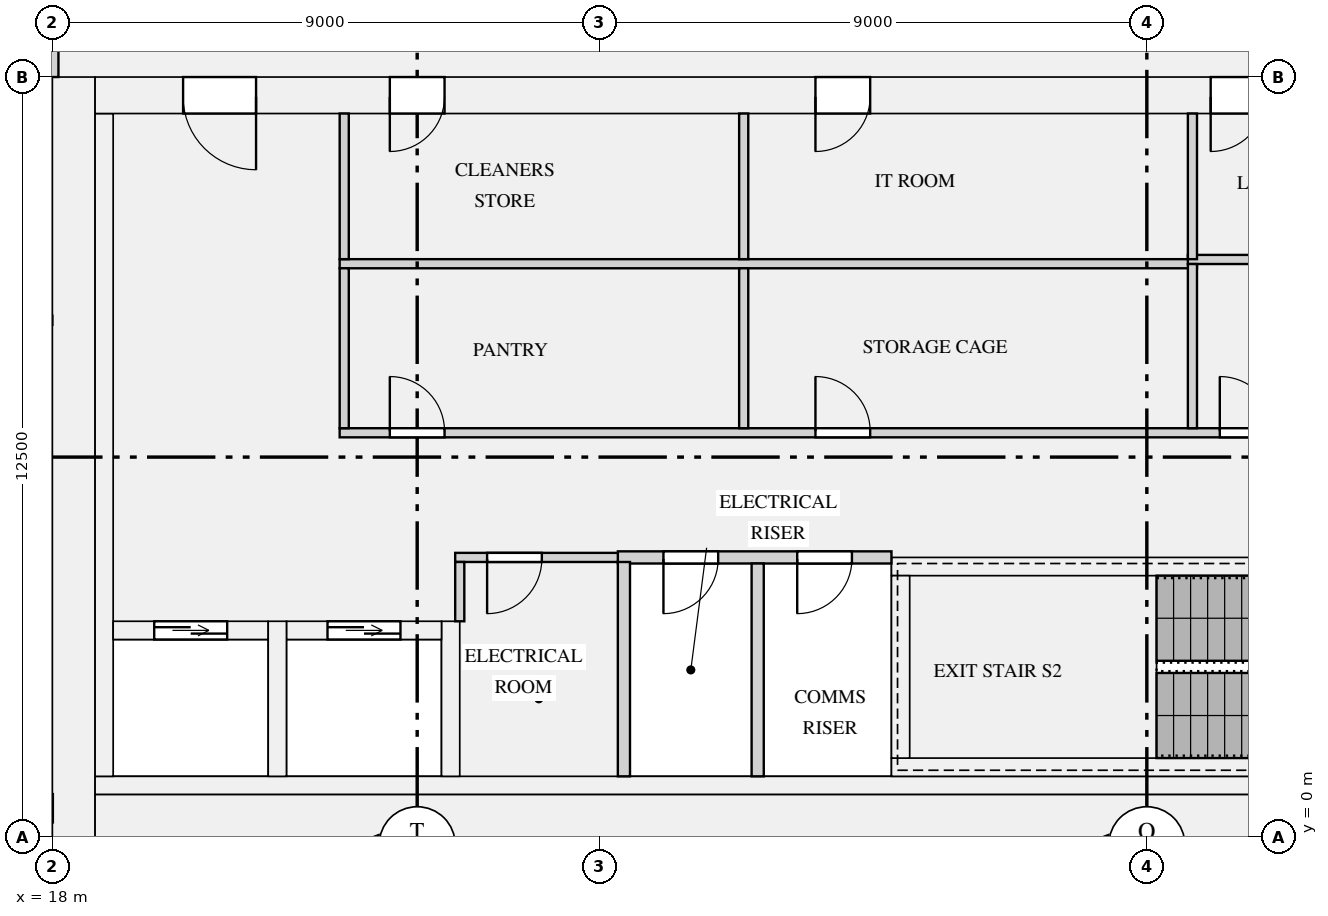
"""IFC4 building model, lengths in metres.
Left out: names, types, materials, properties, quantities, classifications, styles, units other than length and angle.
Written with IfcOpenShell. Run it as: python <this file> out.ifc"""

import sys

from ifc_helpers import new_model, si_unit, direction, frame, frame_2d, origin, place, context, subcontext, project, spatial, rectangle, extrude, element, fill, save


model = new_model("IFC4")
c1 = context("Model", 3, precision=1e-05, world=origin(), true_north=direction((0.0, 1.0)))
c2 = subcontext(c1, "Body", "Model", "MODEL_VIEW")
j1 = project(units=[si_unit("LENGTHUNIT", "METRE"), si_unit("PLANEANGLEUNIT", "RADIAN")], contexts=[c1])
p1 = place(None, origin())
s1 = spatial("IfcSite", under=j1, at=p1, CompositionType="ELEMENT")
p2 = place(p1, origin())
s2 = spatial("IfcBuilding", under=s1, at=p2, CompositionType="ELEMENT")
p3 = place(p2, frame((0.0, 0.0, 179.1)))
s3 = spatial("IfcBuildingStorey", under=s2, at=p3, CompositionType="ELEMENT", Elevation=179.1)
p4 = place(p3, frame((18.35, 0.0, 0.0), z_axis=(0.0, 0.0, 1.0), x_axis=(0.0, 1.0, 0.0)))
e1 = element("IfcWall", 1, at=p4, inside=s3, PredefinedType="SHEAR", context=c2, shape_type="SweptSolid", body=[
    extrude(rectangle(XDim=12.5, YDim=0.7, at=frame_2d((6.25, 0.0))), origin(), (0.0, 0.0, 1.0), 3.15),
])
p5 = place(p3, frame((18.7, 0.35, 0.0), z_axis=(0.0, 0.0, 1.0), x_axis=(1.0, 0.0, 0.0)))
e2 = element("IfcWall", 2, at=p5, inside=s3, PredefinedType="SHEAR", context=c2, shape_type="SweptSolid", body=[
    extrude(rectangle(XDim=34.6, YDim=0.7, at=frame_2d((17.3, 0.0))), origin(), (0.0, 0.0, 1.0), 3.15),
])
p6 = place(p3, frame((18.7, 12.2, 0.0), z_axis=(0.0, 0.0, 1.0), x_axis=(1.0, 0.0, 0.0)))
e3 = element("IfcWall", 3, at=p6, inside=s3, PredefinedType="SHEAR", context=c2, shape_type="SweptSolid", body=[
    extrude(rectangle(XDim=34.6, YDim=0.6, at=frame_2d((17.3, 0.0))), origin(), (0.0, 0.0, 1.0), 3.15),
])
p7 = place(p6, frame((24.475, 0.0, 0.0)))
e4 = element("IfcOpeningElement", 4, at=p7, cuts=e3, PredefinedType="OPENING", context=c2, shape_type="SweptSolid", body=[
    extrude(rectangle(XDim=1.1, YDim=2.1, at=frame_2d((0.55, 1.05))), frame((0.0, 0.31, 0.0), z_axis=(0.0, -1.0, 0.0), x_axis=(1.0, 0.0, 0.0)), (0.0, 0.0, 1.0), 0.62),
])
p8 = place(p6, frame((26.725, 0.0, 0.0)))
e5 = element("IfcOpeningElement", 5, at=p8, cuts=e3, PredefinedType="OPENING", context=c2, shape_type="SweptSolid", body=[
    extrude(rectangle(XDim=1.1, YDim=2.1, at=frame_2d((0.55, 1.05))), frame((0.0, 0.31, 0.0), z_axis=(0.0, -1.0, 0.0), x_axis=(1.0, 0.0, 0.0)), (0.0, 0.0, 1.0), 0.62),
])
p9 = place(p6, frame((28.975, 0.0, 0.0)))
e6 = element("IfcOpeningElement", 6, at=p9, cuts=e3, PredefinedType="OPENING", context=c2, shape_type="SweptSolid", body=[
    extrude(rectangle(XDim=1.1, YDim=2.1, at=frame_2d((0.55, 1.05))), frame((0.0, 0.31, 0.0), z_axis=(0.0, -1.0, 0.0), x_axis=(1.0, 0.0, 0.0)), (0.0, 0.0, 1.0), 0.62),
])
p10 = place(p6, frame((4.85, 0.0, 0.0)))
e7 = element("IfcOpeningElement", 7, at=p10, cuts=e3, PredefinedType="OPENING", context=c2, shape_type="SweptSolid", body=[
    extrude(rectangle(XDim=0.9, YDim=2.1, at=frame_2d((0.45, 1.05))), frame((0.0, 0.31, 0.0), z_axis=(0.0, -1.0, 0.0), x_axis=(1.0, 0.0, 0.0)), (0.0, 0.0, 1.0), 0.62),
])
p11 = place(p6, frame((11.85, 0.0, 0.0)))
e8 = element("IfcOpeningElement", 8, at=p11, cuts=e3, PredefinedType="OPENING", context=c2, shape_type="SweptSolid", body=[
    extrude(rectangle(XDim=0.9, YDim=2.1, at=frame_2d((0.45, 1.05))), frame((0.0, 0.31, 0.0), z_axis=(0.0, -1.0, 0.0), x_axis=(1.0, 0.0, 0.0)), (0.0, 0.0, 1.0), 0.62),
])
p12 = place(p6, frame((18.35, 0.0, 0.0)))
e9 = element("IfcOpeningElement", 9, at=p12, cuts=e3, PredefinedType="OPENING", context=c2, shape_type="SweptSolid", body=[
    extrude(rectangle(XDim=0.9, YDim=2.1, at=frame_2d((0.45, 1.05))), frame((0.0, 0.31, 0.0), z_axis=(0.0, -1.0, 0.0), x_axis=(1.0, 0.0, 0.0)), (0.0, 0.0, 1.0), 0.62),
])
p13 = place(p6, frame((1.45, 0.0, 0.0)))
e10 = element("IfcOpeningElement", 10, at=p13, cuts=e3, PredefinedType="OPENING", context=c2, shape_type="SweptSolid", body=[
    extrude(rectangle(XDim=1.2, YDim=2.1, at=frame_2d((0.6, 1.05))), frame((0.0, 0.31, 0.0), z_axis=(0.0, -1.0, 0.0), x_axis=(1.0, 0.0, 0.0)), (0.0, 0.0, 1.0), 0.62),
])
p14 = place(p6, frame((31.95, 0.0, 0.0)))
e11 = element("IfcOpeningElement", 11, at=p14, cuts=e3, PredefinedType="OPENING", context=c2, shape_type="SweptSolid", body=[
    extrude(rectangle(XDim=1.2, YDim=2.1, at=frame_2d((0.6, 1.05))), frame((0.0, 0.31, 0.0), z_axis=(0.0, -1.0, 0.0), x_axis=(1.0, 0.0, 0.0)), (0.0, 0.0, 1.0), 0.62),
])
p15 = place(p3, frame((18.85, 1.0, 0.0), z_axis=(0.0, 0.0, 1.0), x_axis=(0.0, 1.0, 0.0)))
e12 = element("IfcWall", 12, at=p15, inside=s3, PredefinedType="SHEAR", context=c2, shape_type="SweptSolid", body=[
    extrude(rectangle(XDim=10.9, YDim=0.3, at=frame_2d((5.45, 0.0))), origin(), (0.0, 0.0, 1.0), 3.15),
])
p16 = place(p3, frame((18.7, 0.85, 0.0), z_axis=(0.0, 0.0, 1.0), x_axis=(1.0, 0.0, 0.0)))
e13 = element("IfcWall", 13, at=p16, inside=s3, PredefinedType="SHEAR", context=c2, shape_type="SweptSolid", body=[
    extrude(rectangle(XDim=34.6, YDim=0.3, at=frame_2d((17.3, 0.0))), origin(), (0.0, 0.0, 1.0), 3.15),
])
p17 = place(p3, frame((19.0, 3.4, 0.0), z_axis=(0.0, 0.0, 1.0), x_axis=(1.0, 0.0, 0.0)))
e14 = element("IfcWall", 14, at=p17, inside=s3, PredefinedType="SHEAR", context=c2, shape_type="SweptSolid", body=[
    extrude(rectangle(XDim=2.55, YDim=0.3, at=frame_2d((1.275, 0.0))), origin(), (0.0, 0.0, 1.0), 3.15),
])
p18 = place(p17, frame((0.675, 0.0, 0.0)))
e15 = element("IfcOpeningElement", 15, at=p18, cuts=e14, PredefinedType="OPENING", context=c2, shape_type="SweptSolid", body=[
    extrude(rectangle(XDim=1.2, YDim=2.1, at=frame_2d((0.6, 1.05))), frame((0.0, 0.16, 0.0), z_axis=(0.0, -1.0, 0.0), x_axis=(1.0, 0.0, 0.0)), (0.0, 0.0, 1.0), 0.32),
])
p19 = place(p3, frame((21.85, 3.4, 0.0), z_axis=(0.0, 0.0, 1.0), x_axis=(1.0, 0.0, 0.0)))
e16 = element("IfcWall", 16, at=p19, inside=s3, PredefinedType="SHEAR", context=c2, shape_type="SweptSolid", body=[
    extrude(rectangle(XDim=2.55, YDim=0.3, at=frame_2d((1.275, 0.0))), origin(), (0.0, 0.0, 1.0), 3.15),
])
p20 = place(p19, frame((0.675, 0.0, 0.0)))
e17 = element("IfcOpeningElement", 17, at=p20, cuts=e16, PredefinedType="OPENING", context=c2, shape_type="SweptSolid", body=[
    extrude(rectangle(XDim=1.2, YDim=2.1, at=frame_2d((0.6, 1.05))), frame((0.0, 0.16, 0.0), z_axis=(0.0, -1.0, 0.0), x_axis=(1.0, 0.0, 0.0)), (0.0, 0.0, 1.0), 0.32),
])
for number, where, z_axis, x_axis in (
    (18, (21.7, 1.0, 0.0), (0.0, 0.0, 1.0), (0.0, 1.0, 0.0)),
    (19, (24.55, 1.0, 0.0), (0.0, 0.0, 1.0), (0.0, 1.0, 0.0)),
):
    element("IfcWall", number, at=place(p3, frame(where, z_axis=z_axis, x_axis=x_axis)), inside=s3, PredefinedType="SHEAR", context=c2, shape_type="SweptSolid", body=[
        extrude(rectangle(XDim=2.55, YDim=0.3, at=frame_2d((1.275, 0.0))), origin(), (0.0, 0.0, 1.0), 3.15),
    ])
p21 = place(p3, frame((31.8, 1.15, 0.0), z_axis=(0.0, 0.0, 1.0), x_axis=(1.0, 0.0, 0.0)))
e20 = element("IfcWall", 20, at=p21, inside=s3, PredefinedType="SHEAR", context=c2, shape_type="SweptSolid", body=[
    extrude(rectangle(XDim=8.4, YDim=0.3, at=frame_2d((4.2, 0.0))), origin(), (0.0, 0.0, 1.0), 3.15),
])
p22 = place(p3, frame((31.8, 4.45, 0.0), z_axis=(0.0, 0.0, 1.0), x_axis=(1.0, 0.0, 0.0)))
e21 = element("IfcWall", 21, at=p22, inside=s3, PredefinedType="SHEAR", context=c2, shape_type="SweptSolid", body=[
    extrude(rectangle(XDim=8.4, YDim=0.3, at=frame_2d((4.2, 0.0))), origin(), (0.0, 0.0, 1.0), 3.15),
])
p23 = place(p22, frame((6.8, 0.0, 0.0)))
e22 = element("IfcOpeningElement", 22, at=p23, cuts=e21, PredefinedType="OPENING", context=c2, shape_type="SweptSolid", body=[
    extrude(rectangle(XDim=1.1, YDim=2.1, at=frame_2d((0.55, 1.05))), frame((0.0, 0.16, 0.0), z_axis=(0.0, -1.0, 0.0), x_axis=(1.0, 0.0, 0.0)), (0.0, 0.0, 1.0), 0.32),
])
p24 = place(p3, frame((31.95, 1.3, 0.0), z_axis=(0.0, 0.0, 1.0), x_axis=(0.0, 1.0, 0.0)))
e23 = element("IfcWall", 23, at=p24, inside=s3, PredefinedType="SHEAR", context=c2, shape_type="SweptSolid", body=[
    extrude(rectangle(XDim=3.0, YDim=0.3, at=frame_2d((1.5, 0.0))), origin(), (0.0, 0.0, 1.0), 3.15),
])
p25 = place(p3, frame((27.3, 4.6, 0.0), z_axis=(0.0, 0.0, 1.0), x_axis=(1.0, 0.0, 0.0)))
e24 = element("IfcWall", 24, at=p25, inside=s3, PredefinedType="PARTITIONING", context=c2, shape_type="SweptSolid", body=[
    extrude(rectangle(XDim=4.5, YDim=0.2, at=frame_2d((2.25, 0.0))), origin(), (0.0, 0.0, 1.0), 2.83),
])
p26 = place(p25, frame((0.75, 0.0, 0.0)))
e25 = element("IfcOpeningElement", 25, at=p26, cuts=e24, PredefinedType="OPENING", context=c2, shape_type="SweptSolid", body=[
    extrude(rectangle(XDim=0.9, YDim=2.1, at=frame_2d((0.45, 1.05))), frame((0.0, 0.11, 0.0), z_axis=(0.0, -1.0, 0.0), x_axis=(1.0, 0.0, 0.0)), (0.0, 0.0, 1.0), 0.22),
])
p27 = place(p25, frame((2.95, 0.0, 0.0)))
e26 = element("IfcOpeningElement", 26, at=p27, cuts=e24, PredefinedType="OPENING", context=c2, shape_type="SweptSolid", body=[
    extrude(rectangle(XDim=0.9, YDim=2.1, at=frame_2d((0.45, 1.05))), frame((0.0, 0.11, 0.0), z_axis=(0.0, -1.0, 0.0), x_axis=(1.0, 0.0, 0.0)), (0.0, 0.0, 1.0), 0.22),
])
p28 = place(p3, frame((24.625, 4.6, 0.0), z_axis=(0.0, 0.0, 1.0), x_axis=(1.0, 0.0, 0.0)))
e27 = element("IfcWall", 27, at=p28, inside=s3, PredefinedType="PARTITIONING", context=c2, shape_type="SweptSolid", body=[
    extrude(rectangle(XDim=2.675, YDim=0.15, at=frame_2d((1.337, 0.0))), origin(), (0.0, 0.0, 1.0), 2.83),
])
p29 = place(p28, frame((0.525, 0.0, 0.0)))
e28 = element("IfcOpeningElement", 28, at=p29, cuts=e27, PredefinedType="OPENING", context=c2, shape_type="SweptSolid", body=[
    extrude(rectangle(XDim=0.9, YDim=2.1, at=frame_2d((0.45, 1.05))), frame((0.0, 0.085, 0.0), z_axis=(0.0, -1.0, 0.0), x_axis=(1.0, 0.0, 0.0)), (0.0, 0.0, 1.0), 0.17),
])
p30 = place(p3, frame((22.725, 6.65, 0.0), z_axis=(0.0, 0.0, 1.0), x_axis=(1.0, 0.0, 0.0)))
e29 = element("IfcWall", 29, at=p30, inside=s3, PredefinedType="PARTITIONING", context=c2, shape_type="SweptSolid", body=[
    extrude(rectangle(XDim=19.8, YDim=0.15, at=frame_2d((9.9, 0.0))), origin(), (0.0, 0.0, 1.0), 2.83),
])
p31 = place(p30, frame((0.825, 0.0, 0.0)))
e30 = element("IfcOpeningElement", 30, at=p31, cuts=e29, PredefinedType="OPENING", context=c2, shape_type="SweptSolid", body=[
    extrude(rectangle(XDim=0.9, YDim=2.1, at=frame_2d((0.45, 1.05))), frame((0.0, 0.085, 0.0), z_axis=(0.0, -1.0, 0.0), x_axis=(1.0, 0.0, 0.0)), (0.0, 0.0, 1.0), 0.17),
])
p32 = place(p30, frame((7.825, 0.0, 0.0)))
e31 = element("IfcOpeningElement", 31, at=p32, cuts=e29, PredefinedType="OPENING", context=c2, shape_type="SweptSolid", body=[
    extrude(rectangle(XDim=0.9, YDim=2.1, at=frame_2d((0.45, 1.05))), frame((0.0, 0.085, 0.0), z_axis=(0.0, -1.0, 0.0), x_axis=(1.0, 0.0, 0.0)), (0.0, 0.0, 1.0), 0.17),
])
p33 = place(p30, frame((14.475, 0.0, 0.0)))
e32 = element("IfcOpeningElement", 32, at=p33, cuts=e29, PredefinedType="OPENING", context=c2, shape_type="SweptSolid", body=[
    extrude(rectangle(XDim=0.9, YDim=2.1, at=frame_2d((0.45, 1.05))), frame((0.0, 0.085, 0.0), z_axis=(0.0, -1.0, 0.0), x_axis=(1.0, 0.0, 0.0)), (0.0, 0.0, 1.0), 0.17),
])
p34 = place(p3, frame((22.725, 9.43, 0.0), z_axis=(0.0, 0.0, 1.0), x_axis=(1.0, 0.0, 0.0)))
e33 = element("IfcWall", 33, at=p34, inside=s3, PredefinedType="PARTITIONING", context=c2, shape_type="SweptSolid", body=[
    extrude(rectangle(XDim=14.1, YDim=0.15, at=frame_2d((7.05, 0.0))), origin(), (0.0, 0.0, 1.0), 2.83),
])
p35 = place(p3, frame((36.675, 9.5, 0.0), z_axis=(0.0, 0.0, 1.0), x_axis=(1.0, 0.0, 0.0)))
e34 = element("IfcWall", 34, at=p35, inside=s3, PredefinedType="PARTITIONING", context=c2, shape_type="SweptSolid", body=[
    extrude(rectangle(XDim=5.775, YDim=0.15, at=frame_2d((2.887, 0.0))), origin(), (0.0, 0.0, 1.0), 2.83),
])
p36 = place(p3, frame((27.4, 1.0, 0.0), z_axis=(0.0, 0.0, 1.0), x_axis=(0.0, 1.0, 0.0)))
e35 = element("IfcWall", 35, at=p36, inside=s3, PredefinedType="PARTITIONING", context=c2, shape_type="SweptSolid", body=[
    extrude(rectangle(XDim=3.525, YDim=0.2, at=frame_2d((1.762, 0.0))), origin(), (0.0, 0.0, 1.0), 2.83),
])
p37 = place(p3, frame((29.6, 1.0, 0.0), z_axis=(0.0, 0.0, 1.0), x_axis=(0.0, 1.0, 0.0)))
e36 = element("IfcWall", 36, at=p37, inside=s3, PredefinedType="PARTITIONING", context=c2, shape_type="SweptSolid", body=[
    extrude(rectangle(XDim=3.5, YDim=0.2, at=frame_2d((1.75, 0.0))), origin(), (0.0, 0.0, 1.0), 2.83),
])
p38 = place(p3, frame((24.7, 3.55, 0.0), z_axis=(0.0, 0.0, 1.0), x_axis=(0.0, 1.0, 0.0)))
e37 = element("IfcWall", 37, at=p38, inside=s3, PredefinedType="PARTITIONING", context=c2, shape_type="SweptSolid", body=[
    extrude(rectangle(XDim=0.975, YDim=0.15, at=frame_2d((0.487, 0.0))), origin(), (0.0, 0.0, 1.0), 2.83),
])
for number, where, z_axis, x_axis in (
    (38, (22.8, 6.725, 0.0), (0.0, 0.0, 1.0), (0.0, 1.0, 0.0)),
    (39, (29.37, 6.725, 0.0), (0.0, 0.0, 1.0), (0.0, 1.0, 0.0)),
):
    element("IfcWall", number, at=place(p3, frame(where, z_axis=z_axis, x_axis=x_axis)), inside=s3, PredefinedType="PARTITIONING", context=c2, shape_type="SweptSolid", body=[
        extrude(rectangle(XDim=2.63, YDim=0.15, at=frame_2d((1.315, 0.0))), origin(), (0.0, 0.0, 1.0), 2.83),
    ])
p39 = place(p3, frame((36.75, 6.725, 0.0), z_axis=(0.0, 0.0, 1.0), x_axis=(0.0, 1.0, 0.0)))
e40 = element("IfcWall", 40, at=p39, inside=s3, PredefinedType="PARTITIONING", context=c2, shape_type="SweptSolid", body=[
    extrude(rectangle(XDim=2.7, YDim=0.15, at=frame_2d((1.35, 0.0))), origin(), (0.0, 0.0, 1.0), 2.83),
])
for number, where, z_axis, x_axis in (
    (41, (22.8, 9.505, 0.0), (0.0, 0.0, 1.0), (0.0, 1.0, 0.0)),
    (42, (29.37, 9.505, 0.0), (0.0, 0.0, 1.0), (0.0, 1.0, 0.0)),
    (43, (36.75, 9.505, 0.0), (0.0, 0.0, 1.0), (0.0, 1.0, 0.0)),
):
    element("IfcWall", number, at=place(p3, frame(where, z_axis=z_axis, x_axis=x_axis)), inside=s3, PredefinedType="PARTITIONING", context=c2, shape_type="SweptSolid", body=[
        extrude(rectangle(XDim=2.395, YDim=0.15, at=frame_2d((1.198, 0.0))), origin(), (0.0, 0.0, 1.0), 2.83),
    ])
p40 = place(p3, frame((18.0, 12.5, 0.0), z_axis=(0.0, 0.0, 1.0), x_axis=(0.0, 1.0, 0.0)))
e44 = element("IfcWall", 44, at=p40, inside=s3, PredefinedType="PARTITIONING", context=c2, shape_type="SweptSolid", body=[
    extrude(rectangle(XDim=3.4, YDim=0.2, at=frame_2d((1.7, 0.0))), origin(), (0.0, 0.0, 1.0), 2.83),
])
p41 = place(p18, origin())
e45 = element("IfcDoor", 45, at=p41, inside=s3, OperationType="DOUBLE_DOOR_SLIDING", PredefinedType="DOOR", context=c2, shape_type="SweptSolid", body=[
    extrude(rectangle(XDim=1.2, YDim=2.1, at=frame_2d((0.6, 1.05))), frame((0.0, 0.025, 0.0), z_axis=(0.0, -1.0, 0.0), x_axis=(1.0, 0.0, 0.0)), (0.0, 0.0, 1.0), 0.05),
])
fill(e15, e45)
p42 = place(p20, origin())
e46 = element("IfcDoor", 46, at=p42, inside=s3, OperationType="DOUBLE_DOOR_SLIDING", PredefinedType="DOOR", context=c2, shape_type="SweptSolid", body=[
    extrude(rectangle(XDim=1.2, YDim=2.1, at=frame_2d((0.6, 1.05))), frame((0.0, 0.025, 0.0), z_axis=(0.0, -1.0, 0.0), x_axis=(1.0, 0.0, 0.0)), (0.0, 0.0, 1.0), 0.05),
])
fill(e17, e46)
p43 = place(p29, frame((0.9, 0.0, 0.0), z_axis=(0.0, 0.0, 1.0), x_axis=(-1.0, 0.0, 0.0)))
e47 = element("IfcDoor", 47, at=p43, inside=s3, OperationType="SINGLE_SWING_RIGHT", PredefinedType="DOOR", context=c2, shape_type="SweptSolid", body=[
    extrude(rectangle(XDim=0.9, YDim=2.1, at=frame_2d((0.45, 1.05))), frame((0.0, 0.025, 0.0), z_axis=(0.0, -1.0, 0.0), x_axis=(1.0, 0.0, 0.0)), (0.0, 0.0, 1.0), 0.05),
])
fill(e28, e47)
p44 = place(p31, origin())
e48 = element("IfcDoor", 48, at=p44, inside=s3, OperationType="SINGLE_SWING_LEFT", PredefinedType="DOOR", context=c2, shape_type="SweptSolid", body=[
    extrude(rectangle(XDim=0.9, YDim=2.1, at=frame_2d((0.45, 1.05))), frame((0.0, 0.025, 0.0), z_axis=(0.0, -1.0, 0.0), x_axis=(1.0, 0.0, 0.0)), (0.0, 0.0, 1.0), 0.05),
])
fill(e30, e48)
p45 = place(p32, origin())
e49 = element("IfcDoor", 49, at=p45, inside=s3, OperationType="SINGLE_SWING_LEFT", PredefinedType="DOOR", context=c2, shape_type="SweptSolid", body=[
    extrude(rectangle(XDim=0.9, YDim=2.1, at=frame_2d((0.45, 1.05))), frame((0.0, 0.025, 0.0), z_axis=(0.0, -1.0, 0.0), x_axis=(1.0, 0.0, 0.0)), (0.0, 0.0, 1.0), 0.05),
])
fill(e31, e49)
p46 = place(p10, frame((0.9, 0.0, 0.0), z_axis=(0.0, 0.0, 1.0), x_axis=(-1.0, 0.0, 0.0)))
e50 = element("IfcDoor", 50, at=p46, inside=s3, OperationType="SINGLE_SWING_RIGHT", PredefinedType="DOOR", context=c2, shape_type="SweptSolid", body=[
    extrude(rectangle(XDim=0.9, YDim=2.1, at=frame_2d((0.45, 1.05))), frame((0.0, 0.025, 0.0), z_axis=(0.0, -1.0, 0.0), x_axis=(1.0, 0.0, 0.0)), (0.0, 0.0, 1.0), 0.05),
])
fill(e7, e50)
p47 = place(p11, frame((0.9, 0.0, 0.0), z_axis=(0.0, 0.0, 1.0), x_axis=(-1.0, 0.0, 0.0)))
e51 = element("IfcDoor", 51, at=p47, inside=s3, OperationType="SINGLE_SWING_RIGHT", PredefinedType="DOOR", context=c2, shape_type="SweptSolid", body=[
    extrude(rectangle(XDim=0.9, YDim=2.1, at=frame_2d((0.45, 1.05))), frame((0.0, 0.025, 0.0), z_axis=(0.0, -1.0, 0.0), x_axis=(1.0, 0.0, 0.0)), (0.0, 0.0, 1.0), 0.05),
])
fill(e8, e51)
p48 = place(p33, origin())
e52 = element("IfcDoor", 52, at=p48, inside=s3, OperationType="SINGLE_SWING_LEFT", PredefinedType="DOOR", context=c2, shape_type="SweptSolid", body=[
    extrude(rectangle(XDim=0.9, YDim=2.1, at=frame_2d((0.45, 1.05))), frame((0.0, 0.025, 0.0), z_axis=(0.0, -1.0, 0.0), x_axis=(1.0, 0.0, 0.0)), (0.0, 0.0, 1.0), 0.05),
])
fill(e32, e52)
p49 = place(p12, frame((0.9, 0.0, 0.0), z_axis=(0.0, 0.0, 1.0), x_axis=(-1.0, 0.0, 0.0)))
e53 = element("IfcDoor", 53, at=p49, inside=s3, OperationType="SINGLE_SWING_RIGHT", PredefinedType="DOOR", context=c2, shape_type="SweptSolid", body=[
    extrude(rectangle(XDim=0.9, YDim=2.1, at=frame_2d((0.45, 1.05))), frame((0.0, 0.025, 0.0), z_axis=(0.0, -1.0, 0.0), x_axis=(1.0, 0.0, 0.0)), (0.0, 0.0, 1.0), 0.05),
])
fill(e9, e53)
p50 = place(p26, frame((0.9, 0.0, 0.0), z_axis=(0.0, 0.0, 1.0), x_axis=(-1.0, 0.0, 0.0)))
e54 = element("IfcDoor", 54, at=p50, inside=s3, OperationType="SINGLE_SWING_RIGHT", PredefinedType="DOOR", context=c2, shape_type="SweptSolid", body=[
    extrude(rectangle(XDim=0.9, YDim=2.1, at=frame_2d((0.45, 1.05))), frame((0.0, 0.025, 0.0), z_axis=(0.0, -1.0, 0.0), x_axis=(1.0, 0.0, 0.0)), (0.0, 0.0, 1.0), 0.05),
])
fill(e25, e54)
p51 = place(p27, frame((0.9, 0.0, 0.0), z_axis=(0.0, 0.0, 1.0), x_axis=(-1.0, 0.0, 0.0)))
e55 = element("IfcDoor", 55, at=p51, inside=s3, OperationType="SINGLE_SWING_RIGHT", PredefinedType="DOOR", context=c2, shape_type="SweptSolid", body=[
    extrude(rectangle(XDim=0.9, YDim=2.1, at=frame_2d((0.45, 1.05))), frame((0.0, 0.025, 0.0), z_axis=(0.0, -1.0, 0.0), x_axis=(1.0, 0.0, 0.0)), (0.0, 0.0, 1.0), 0.05),
])
fill(e26, e55)
p52 = place(p13, frame((1.2, 0.0, 0.0), z_axis=(0.0, 0.0, 1.0), x_axis=(-1.0, 0.0, 0.0)))
e56 = element("IfcDoor", 56, at=p52, inside=s3, OperationType="SINGLE_SWING_LEFT", PredefinedType="DOOR", context=c2, shape_type="SweptSolid", body=[
    extrude(rectangle(XDim=1.2, YDim=2.1, at=frame_2d((0.6, 1.05))), frame((0.0, 0.025, 0.0), z_axis=(0.0, -1.0, 0.0), x_axis=(1.0, 0.0, 0.0)), (0.0, 0.0, 1.0), 0.05),
])
fill(e10, e56)
save(model, sys.argv[1])
